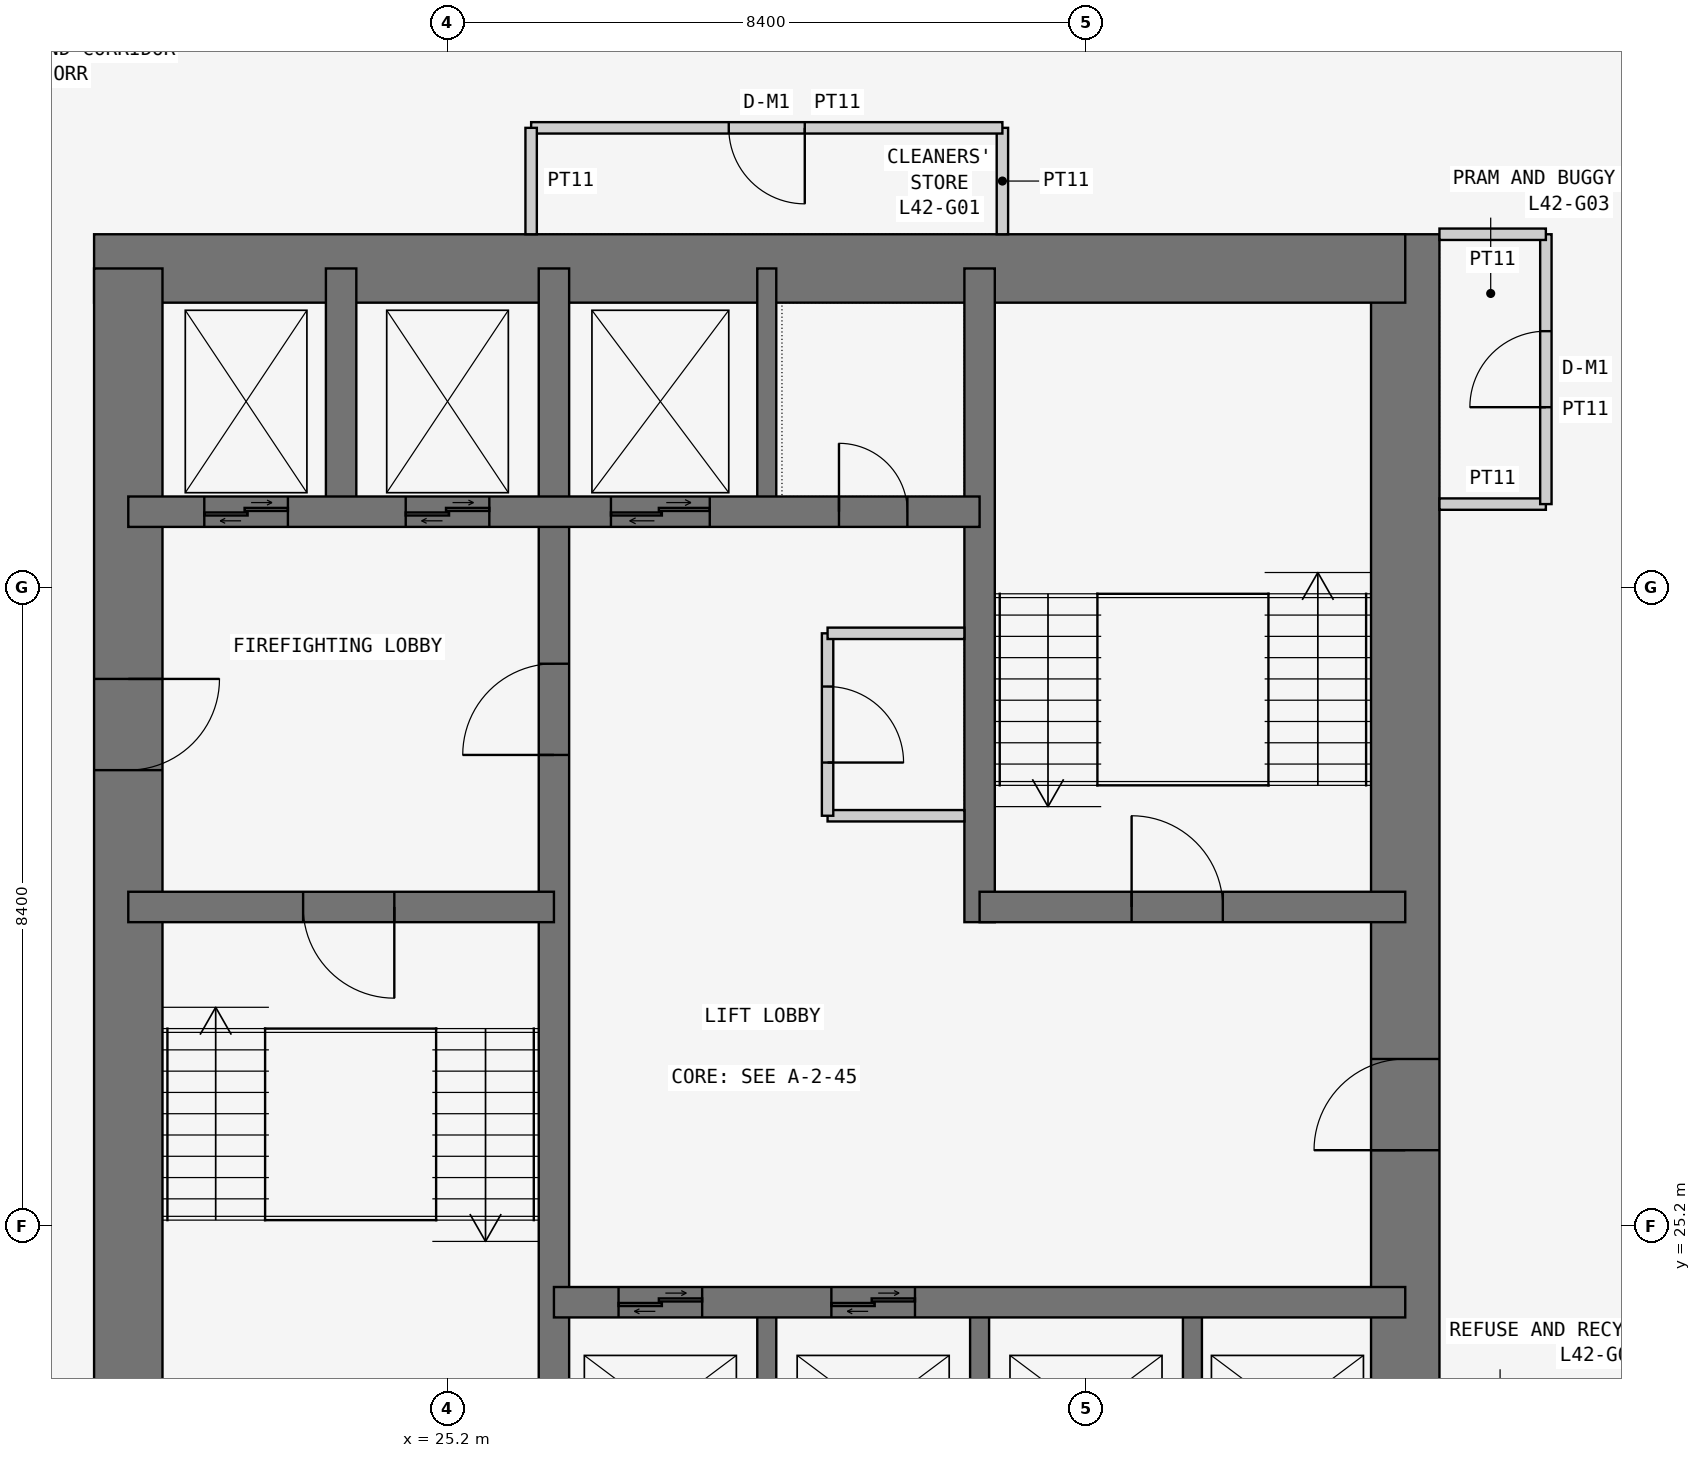
"""IFC4 building model, lengths in metres.
Left out: names, types, materials, properties, quantities, classifications, styles, units other than length and angle.
Written with IfcOpenShell. Run it as: python <this file> out.ifc"""

import sys

from ifc_helpers import new_model, si_unit, direction, frame, frame_2d, origin, place, context, subcontext, project, spatial, rectangle, extrude, element, fill, save


model = new_model("IFC4")
c1 = context("Model", 3, precision=1e-05, world=origin(), true_north=direction((0.0, 1.0)))
c2 = subcontext(c1, "Body", "Model", "MODEL_VIEW")
j1 = project(units=[si_unit("LENGTHUNIT", "METRE"), si_unit("PLANEANGLEUNIT", "RADIAN")], contexts=[c1])
p1 = place(None, origin())
s1 = spatial("IfcSite", under=j1, at=p1, CompositionType="ELEMENT")
p2 = place(p1, origin())
s2 = spatial("IfcBuilding", under=s1, at=p2, CompositionType="ELEMENT")
p3 = place(p2, frame((0.0, 0.0, 162.9)))
s3 = spatial("IfcBuildingStorey", under=s2, at=p3, CompositionType="ELEMENT", Elevation=162.9)
p4 = place(p3, frame((37.8, 21.0, 0.0), z_axis=(0.0, 0.0, 1.0), x_axis=(0.0, 1.0, 0.0)))
e1 = element("IfcWall", 1, at=p4, inside=s3, PredefinedType="SHEAR", context=c2, shape_type="SweptSolid", body=[
    extrude(rectangle(XDim=17.25, YDim=0.9, at=frame_2d((8.625, 0.0))), origin(), (0.0, 0.0, 1.0), 3.6),
])
p5 = place(p4, frame((5.2, 0.0, 0.0)))
e2 = element("IfcOpeningElement", 2, at=p5, cuts=e1, PredefinedType="OPENING", context=c2, shape_type="SweptSolid", body=[
    extrude(rectangle(XDim=1.2, YDim=2.1, at=frame_2d((0.6, 1.05))), frame((0.0, 0.46, 0.0), z_axis=(0.0, -1.0, 0.0), x_axis=(1.0, 0.0, 0.0)), (0.0, 0.0, 1.0), 0.92),
])
p6 = place(p3, frame((37.8, 37.8, 0.0), z_axis=(0.0, 0.0, 1.0), x_axis=(-1.0, 0.0, 0.0)))
e3 = element("IfcWall", 3, at=p6, inside=s3, PredefinedType="SHEAR", context=c2, shape_type="SweptSolid", body=[
    extrude(rectangle(XDim=17.25, YDim=0.9, at=frame_2d((8.625, 0.0))), origin(), (0.0, 0.0, 1.0), 3.6),
])
p7 = place(p3, frame((21.0, 37.8, 0.0), z_axis=(0.0, 0.0, 1.0), x_axis=(0.0, -1.0, 0.0)))
e4 = element("IfcWall", 4, at=p7, inside=s3, PredefinedType="SHEAR", context=c2, shape_type="SweptSolid", body=[
    extrude(rectangle(XDim=17.25, YDim=0.9, at=frame_2d((8.625, 0.0))), origin(), (0.0, 0.0, 1.0), 3.6),
])
p8 = place(p7, frame((5.4, 0.0, 0.0)))
e5 = element("IfcOpeningElement", 5, at=p8, cuts=e4, PredefinedType="OPENING", context=c2, shape_type="SweptSolid", body=[
    extrude(rectangle(XDim=1.2, YDim=2.1, at=frame_2d((0.6, 1.05))), frame((0.0, 0.46, 0.0), z_axis=(0.0, -1.0, 0.0), x_axis=(1.0, 0.0, 0.0)), (0.0, 0.0, 1.0), 0.92),
])
p9 = place(p3, frame((26.6, 21.0, 0.0), z_axis=(0.0, 0.0, 1.0), x_axis=(0.0, 1.0, 0.0)))
e6 = element("IfcWall", 6, at=p9, inside=s3, PredefinedType="SHEAR", context=c2, shape_type="SweptSolid", body=[
    extrude(rectangle(XDim=16.8, YDim=0.4, at=frame_2d((8.4, 0.0))), origin(), (0.0, 0.0, 1.0), 3.6),
])
p10 = place(p9, frame((10.4, 0.0, 0.0)))
e7 = element("IfcOpeningElement", 7, at=p10, cuts=e6, PredefinedType="OPENING", context=c2, shape_type="SweptSolid", body=[
    extrude(rectangle(XDim=1.2, YDim=2.1, at=frame_2d((0.6, 1.05))), frame((0.0, 0.21, 0.0), z_axis=(0.0, -1.0, 0.0), x_axis=(1.0, 0.0, 0.0)), (0.0, 0.0, 1.0), 0.42),
])
p11 = place(p3, frame((21.0, 29.4, 0.0), z_axis=(0.0, 0.0, 1.0), x_axis=(1.0, 0.0, 0.0)))
e8 = element("IfcWall", 8, at=p11, inside=s3, PredefinedType="SHEAR", context=c2, shape_type="SweptSolid", body=[
    extrude(rectangle(XDim=5.6, YDim=0.4, at=frame_2d((2.8, 0.0))), origin(), (0.0, 0.0, 1.0), 3.6),
])
p12 = place(p11, frame((2.3, 0.0, 0.0)))
e9 = element("IfcOpeningElement", 9, at=p12, cuts=e8, PredefinedType="OPENING", context=c2, shape_type="SweptSolid", body=[
    extrude(rectangle(XDim=1.2, YDim=2.1, at=frame_2d((0.6, 1.05))), frame((0.0, 0.21, 0.0), z_axis=(0.0, -1.0, 0.0), x_axis=(1.0, 0.0, 0.0)), (0.0, 0.0, 1.0), 0.42),
])
p13 = place(p3, frame((21.0, 34.6, 0.0), z_axis=(0.0, 0.0, 1.0), x_axis=(1.0, 0.0, 0.0)))
e10 = element("IfcWall", 10, at=p13, inside=s3, PredefinedType="SHEAR", context=c2, shape_type="SweptSolid", body=[
    extrude(rectangle(XDim=11.2, YDim=0.4, at=frame_2d((5.6, 0.0))), origin(), (0.0, 0.0, 1.0), 3.6),
])
p14 = place(p13, frame((9.35, 0.0, 0.0)))
e11 = element("IfcOpeningElement", 11, at=p14, cuts=e10, PredefinedType="OPENING", context=c2, shape_type="SweptSolid", body=[
    extrude(rectangle(XDim=0.9, YDim=2.1, at=frame_2d((0.45, 1.05))), frame((0.0, 0.21, 0.0), z_axis=(0.0, -1.0, 0.0), x_axis=(1.0, 0.0, 0.0)), (0.0, 0.0, 1.0), 0.42),
])
p15 = place(p13, frame((1.0, 0.0, 0.0)))
e12 = element("IfcOpeningElement", 12, at=p15, cuts=e10, PredefinedType="OPENING", context=c2, shape_type="SweptSolid", body=[
    extrude(rectangle(XDim=1.1, YDim=2.1, at=frame_2d((0.55, 1.05))), frame((0.0, 0.21, 0.0), z_axis=(0.0, -1.0, 0.0), x_axis=(1.0, 0.0, 0.0)), (0.0, 0.0, 1.0), 0.42),
])
p16 = place(p13, frame((3.65, 0.0, 0.0)))
e13 = element("IfcOpeningElement", 13, at=p16, cuts=e10, PredefinedType="OPENING", context=c2, shape_type="SweptSolid", body=[
    extrude(rectangle(XDim=1.1, YDim=2.1, at=frame_2d((0.55, 1.05))), frame((0.0, 0.21, 0.0), z_axis=(0.0, -1.0, 0.0), x_axis=(1.0, 0.0, 0.0)), (0.0, 0.0, 1.0), 0.42),
])
p17 = place(p13, frame((6.35, 0.0, 0.0)))
e14 = element("IfcOpeningElement", 14, at=p17, cuts=e10, PredefinedType="OPENING", context=c2, shape_type="SweptSolid", body=[
    extrude(rectangle(XDim=1.3, YDim=2.1, at=frame_2d((0.65, 1.05))), frame((0.0, 0.21, 0.0), z_axis=(0.0, -1.0, 0.0), x_axis=(1.0, 0.0, 0.0)), (0.0, 0.0, 1.0), 0.42),
])
p18 = place(p3, frame((23.8, 34.6, 0.0), z_axis=(0.0, 0.0, 1.0), x_axis=(0.0, 1.0, 0.0)))
e15 = element("IfcWall", 15, at=p18, inside=s3, PredefinedType="SHEAR", context=c2, shape_type="SweptSolid", body=[
    extrude(rectangle(XDim=3.2, YDim=0.4, at=frame_2d((1.6, 0.0))), origin(), (0.0, 0.0, 1.0), 3.6),
])
p19 = place(p3, frame((26.6, 24.2, 0.0), z_axis=(0.0, 0.0, 1.0), x_axis=(1.0, 0.0, 0.0)))
e16 = element("IfcWall", 16, at=p19, inside=s3, PredefinedType="SHEAR", context=c2, shape_type="SweptSolid", body=[
    extrude(rectangle(XDim=11.2, YDim=0.4, at=frame_2d((5.6, 0.0))), origin(), (0.0, 0.0, 1.0), 3.6),
])
p20 = place(p19, frame((0.85, 0.0, 0.0)))
e17 = element("IfcOpeningElement", 17, at=p20, cuts=e16, PredefinedType="OPENING", context=c2, shape_type="SweptSolid", body=[
    extrude(rectangle(XDim=1.1, YDim=2.1, at=frame_2d((0.55, 1.05))), frame((0.0, 0.21, 0.0), z_axis=(0.0, -1.0, 0.0), x_axis=(1.0, 0.0, 0.0)), (0.0, 0.0, 1.0), 0.42),
])
p21 = place(p19, frame((3.65, 0.0, 0.0)))
e18 = element("IfcOpeningElement", 18, at=p21, cuts=e16, PredefinedType="OPENING", context=c2, shape_type="SweptSolid", body=[
    extrude(rectangle(XDim=1.1, YDim=2.1, at=frame_2d((0.55, 1.05))), frame((0.0, 0.21, 0.0), z_axis=(0.0, -1.0, 0.0), x_axis=(1.0, 0.0, 0.0)), (0.0, 0.0, 1.0), 0.42),
])
p22 = place(p3, frame((32.2, 29.2, 0.0), z_axis=(0.0, 0.0, 1.0), x_axis=(0.0, 1.0, 0.0)))
e19 = element("IfcWall", 19, at=p22, inside=s3, PredefinedType="SHEAR", context=c2, shape_type="SweptSolid", body=[
    extrude(rectangle(XDim=8.6, YDim=0.4, at=frame_2d((4.3, 0.0))), origin(), (0.0, 0.0, 1.0), 3.6),
])
p23 = place(p3, frame((32.2, 29.4, 0.0), z_axis=(0.0, 0.0, 1.0), x_axis=(1.0, 0.0, 0.0)))
e20 = element("IfcWall", 20, at=p23, inside=s3, PredefinedType="SHEAR", context=c2, shape_type="SweptSolid", body=[
    extrude(rectangle(XDim=5.6, YDim=0.4, at=frame_2d((2.8, 0.0))), origin(), (0.0, 0.0, 1.0), 3.6),
])
p24 = place(p23, frame((2.0, 0.0, 0.0)))
e21 = element("IfcOpeningElement", 21, at=p24, cuts=e20, PredefinedType="OPENING", context=c2, shape_type="SweptSolid", body=[
    extrude(rectangle(XDim=1.2, YDim=2.1, at=frame_2d((0.6, 1.05))), frame((0.0, 0.21, 0.0), z_axis=(0.0, -1.0, 0.0), x_axis=(1.0, 0.0, 0.0)), (0.0, 0.0, 1.0), 0.42),
])
for number, where, z_axis, x_axis in (
    (22, (29.4, 21.0, 0.0), (0.0, 0.0, 1.0), (0.0, 1.0, 0.0)),
    (23, (32.2, 21.0, 0.0), (0.0, 0.0, 1.0), (0.0, 1.0, 0.0)),
    (24, (35.0, 21.0, 0.0), (0.0, 0.0, 1.0), (0.0, 1.0, 0.0)),
    (25, (29.4, 34.6, 0.0), (0.0, 0.0, 1.0), (0.0, 1.0, 0.0)),
):
    element("IfcWall", number, at=place(p3, frame(where, z_axis=z_axis, x_axis=x_axis)), inside=s3, PredefinedType="SHEAR", context=c2, shape_type="SweptSolid", body=[
        extrude(rectangle(XDim=3.2, YDim=0.25, at=frame_2d((1.6, 0.0))), origin(), (0.0, 0.0, 1.0), 3.6),
    ])
p25 = place(p3, frame((32.5, 38.25, 0.0), z_axis=(0.0, 0.0, 1.0), x_axis=(0.0, 1.0, 0.0)))
e26 = element("IfcWall", 26, at=p25, inside=s3, PredefinedType="PARTITIONING", context=c2, shape_type="SweptSolid", body=[
    extrude(rectangle(XDim=1.4, YDim=0.15, at=frame_2d((0.7, 0.0))), origin(), (0.0, 0.0, 1.0), 3.45),
])
p26 = place(p3, frame((32.5, 39.65, 0.0), z_axis=(0.0, 0.0, 1.0), x_axis=(-1.0, 0.0, 0.0)))
e27 = element("IfcWall", 27, at=p26, inside=s3, PredefinedType="PARTITIONING", context=c2, shape_type="SweptSolid", body=[
    extrude(rectangle(XDim=6.2, YDim=0.15, at=frame_2d((3.1, 0.0))), origin(), (0.0, 0.0, 1.0), 3.45),
])
p27 = place(p26, frame((2.6, 0.0, 0.0)))
e28 = element("IfcOpeningElement", 28, at=p27, cuts=e27, PredefinedType="OPENING", context=c2, shape_type="SweptSolid", body=[
    extrude(rectangle(XDim=1.0, YDim=2.1, at=frame_2d((0.5, 1.05))), frame((0.0, 0.085, 0.0), z_axis=(0.0, -1.0, 0.0), x_axis=(1.0, 0.0, 0.0)), (0.0, 0.0, 1.0), 0.17),
])
for number, where, z_axis, x_axis in (
    (29, (26.3, 39.65, 0.0), (0.0, 0.0, 1.0), (0.0, -1.0, 0.0)),
    (30, (38.25, 34.7, 0.0), (0.0, 0.0, 1.0), (1.0, 0.0, 0.0)),
):
    element("IfcWall", number, at=place(p3, frame(where, z_axis=z_axis, x_axis=x_axis)), inside=s3, PredefinedType="PARTITIONING", context=c2, shape_type="SweptSolid", body=[
        extrude(rectangle(XDim=1.4, YDim=0.15, at=frame_2d((0.7, 0.0))), origin(), (0.0, 0.0, 1.0), 3.45),
    ])
p28 = place(p3, frame((39.65, 34.7, 0.0), z_axis=(0.0, 0.0, 1.0), x_axis=(0.0, 1.0, 0.0)))
e31 = element("IfcWall", 31, at=p28, inside=s3, PredefinedType="PARTITIONING", context=c2, shape_type="SweptSolid", body=[
    extrude(rectangle(XDim=3.55, YDim=0.15, at=frame_2d((1.775, 0.0))), origin(), (0.0, 0.0, 1.0), 3.45),
])
p29 = place(p28, frame((1.275, 0.0, 0.0)))
e32 = element("IfcOpeningElement", 32, at=p29, cuts=e31, PredefinedType="OPENING", context=c2, shape_type="SweptSolid", body=[
    extrude(rectangle(XDim=1.0, YDim=2.1, at=frame_2d((0.5, 1.05))), frame((0.0, 0.085, 0.0), z_axis=(0.0, -1.0, 0.0), x_axis=(1.0, 0.0, 0.0)), (0.0, 0.0, 1.0), 0.17),
])
p30 = place(p3, frame((39.65, 38.25, 0.0), z_axis=(0.0, 0.0, 1.0), x_axis=(-1.0, 0.0, 0.0)))
e33 = element("IfcWall", 33, at=p30, inside=s3, PredefinedType="PARTITIONING", context=c2, shape_type="SweptSolid", body=[
    extrude(rectangle(XDim=1.4, YDim=0.15, at=frame_2d((0.7, 0.0))), origin(), (0.0, 0.0, 1.0), 3.45),
])
p31 = place(p3, frame((32.0, 30.6, 0.0), z_axis=(0.0, 0.0, 1.0), x_axis=(-1.0, 0.0, 0.0)))
e34 = element("IfcWall", 34, at=p31, inside=s3, PredefinedType="PARTITIONING", context=c2, shape_type="SweptSolid", body=[
    extrude(rectangle(XDim=1.8, YDim=0.15, at=frame_2d((0.9, 0.0))), origin(), (0.0, 0.0, 1.0), 3.45),
])
p32 = place(p3, frame((30.2, 30.6, 0.0), z_axis=(0.0, 0.0, 1.0), x_axis=(0.0, 1.0, 0.0)))
e35 = element("IfcWall", 35, at=p32, inside=s3, PredefinedType="PARTITIONING", context=c2, shape_type="SweptSolid", body=[
    extrude(rectangle(XDim=2.4, YDim=0.15, at=frame_2d((1.2, 0.0))), origin(), (0.0, 0.0, 1.0), 3.45),
])
p33 = place(p32, frame((0.7, 0.0, 0.0)))
e36 = element("IfcOpeningElement", 36, at=p33, cuts=e35, PredefinedType="OPENING", context=c2, shape_type="SweptSolid", body=[
    extrude(rectangle(XDim=1.0, YDim=2.1, at=frame_2d((0.5, 1.05))), frame((0.0, 0.085, 0.0), z_axis=(0.0, -1.0, 0.0), x_axis=(1.0, 0.0, 0.0)), (0.0, 0.0, 1.0), 0.17),
])
p34 = place(p3, frame((30.2, 33.0, 0.0), z_axis=(0.0, 0.0, 1.0), x_axis=(1.0, 0.0, 0.0)))
e37 = element("IfcWall", 37, at=p34, inside=s3, PredefinedType="PARTITIONING", context=c2, shape_type="SweptSolid", body=[
    extrude(rectangle(XDim=1.8, YDim=0.15, at=frame_2d((0.9, 0.0))), origin(), (0.0, 0.0, 1.0), 3.45),
])
p35 = place(p27, origin())
e38 = element("IfcDoor", 38, at=p35, inside=s3, OperationType="SINGLE_SWING_LEFT", PredefinedType="DOOR", context=c2, shape_type="SweptSolid", body=[
    extrude(rectangle(XDim=1.0, YDim=2.1, at=frame_2d((0.5, 1.05))), frame((0.0, 0.025, 0.0), z_axis=(0.0, -1.0, 0.0), x_axis=(1.0, 0.0, 0.0)), (0.0, 0.0, 1.0), 0.05),
])
fill(e28, e38)
p36 = place(p29, origin())
e39 = element("IfcDoor", 39, at=p36, inside=s3, OperationType="SINGLE_SWING_LEFT", PredefinedType="DOOR", context=c2, shape_type="SweptSolid", body=[
    extrude(rectangle(XDim=1.0, YDim=2.1, at=frame_2d((0.5, 1.05))), frame((0.0, 0.025, 0.0), z_axis=(0.0, -1.0, 0.0), x_axis=(1.0, 0.0, 0.0)), (0.0, 0.0, 1.0), 0.05),
])
fill(e32, e39)
p37 = place(p8, origin())
e40 = element("IfcDoor", 40, at=p37, inside=s3, OperationType="SINGLE_SWING_LEFT", PredefinedType="DOOR", context=c2, shape_type="SweptSolid", body=[
    extrude(rectangle(XDim=1.2, YDim=2.1, at=frame_2d((0.6, 1.05))), frame((0.0, 0.025, 0.0), z_axis=(0.0, -1.0, 0.0), x_axis=(1.0, 0.0, 0.0)), (0.0, 0.0, 1.0), 0.05),
])
fill(e5, e40)
p38 = place(p12, frame((1.2, 0.0, 0.0), z_axis=(0.0, 0.0, 1.0), x_axis=(-1.0, 0.0, 0.0)))
e41 = element("IfcDoor", 41, at=p38, inside=s3, OperationType="SINGLE_SWING_LEFT", PredefinedType="DOOR", context=c2, shape_type="SweptSolid", body=[
    extrude(rectangle(XDim=1.2, YDim=2.1, at=frame_2d((0.6, 1.05))), frame((0.0, 0.025, 0.0), z_axis=(0.0, -1.0, 0.0), x_axis=(1.0, 0.0, 0.0)), (0.0, 0.0, 1.0), 0.05),
])
fill(e9, e41)
p39 = place(p10, origin())
e42 = element("IfcDoor", 42, at=p39, inside=s3, OperationType="SINGLE_SWING_LEFT", PredefinedType="DOOR", context=c2, shape_type="SweptSolid", body=[
    extrude(rectangle(XDim=1.2, YDim=2.1, at=frame_2d((0.6, 1.05))), frame((0.0, 0.025, 0.0), z_axis=(0.0, -1.0, 0.0), x_axis=(1.0, 0.0, 0.0)), (0.0, 0.0, 1.0), 0.05),
])
fill(e7, e42)
p40 = place(p5, origin())
e43 = element("IfcDoor", 43, at=p40, inside=s3, OperationType="SINGLE_SWING_LEFT", PredefinedType="DOOR", context=c2, shape_type="SweptSolid", body=[
    extrude(rectangle(XDim=1.2, YDim=2.1, at=frame_2d((0.6, 1.05))), frame((0.0, 0.025, 0.0), z_axis=(0.0, -1.0, 0.0), x_axis=(1.0, 0.0, 0.0)), (0.0, 0.0, 1.0), 0.05),
])
fill(e2, e43)
p41 = place(p24, origin())
e44 = element("IfcDoor", 44, at=p41, inside=s3, OperationType="SINGLE_SWING_LEFT", PredefinedType="DOOR", context=c2, shape_type="SweptSolid", body=[
    extrude(rectangle(XDim=1.2, YDim=2.1, at=frame_2d((0.6, 1.05))), frame((0.0, 0.025, 0.0), z_axis=(0.0, -1.0, 0.0), x_axis=(1.0, 0.0, 0.0)), (0.0, 0.0, 1.0), 0.05),
])
fill(e21, e44)
p42 = place(p14, origin())
e45 = element("IfcDoor", 45, at=p42, inside=s3, OperationType="SINGLE_SWING_LEFT", PredefinedType="DOOR", context=c2, shape_type="SweptSolid", body=[
    extrude(rectangle(XDim=0.9, YDim=2.1, at=frame_2d((0.45, 1.05))), frame((0.0, 0.025, 0.0), z_axis=(0.0, -1.0, 0.0), x_axis=(1.0, 0.0, 0.0)), (0.0, 0.0, 1.0), 0.05),
])
fill(e11, e45)
p43 = place(p33, frame((1.0, 0.0, 0.0), z_axis=(0.0, 0.0, 1.0), x_axis=(-1.0, 0.0, 0.0)))
e46 = element("IfcDoor", 46, at=p43, inside=s3, OperationType="SINGLE_SWING_RIGHT", PredefinedType="DOOR", context=c2, shape_type="SweptSolid", body=[
    extrude(rectangle(XDim=1.0, YDim=2.1, at=frame_2d((0.5, 1.05))), frame((0.0, 0.025, 0.0), z_axis=(0.0, -1.0, 0.0), x_axis=(1.0, 0.0, 0.0)), (0.0, 0.0, 1.0), 0.05),
])
fill(e36, e46)
p44 = place(p20, origin())
e47 = element("IfcDoor", 47, at=p44, inside=s3, OperationType="DOUBLE_DOOR_SLIDING", PredefinedType="DOOR", context=c2, shape_type="SweptSolid", body=[
    extrude(rectangle(XDim=1.1, YDim=2.1, at=frame_2d((0.55, 1.05))), frame((0.0, 0.025, 0.0), z_axis=(0.0, -1.0, 0.0), x_axis=(1.0, 0.0, 0.0)), (0.0, 0.0, 1.0), 0.05),
])
fill(e17, e47)
p45 = place(p21, origin())
e48 = element("IfcDoor", 48, at=p45, inside=s3, OperationType="DOUBLE_DOOR_SLIDING", PredefinedType="DOOR", context=c2, shape_type="SweptSolid", body=[
    extrude(rectangle(XDim=1.1, YDim=2.1, at=frame_2d((0.55, 1.05))), frame((0.0, 0.025, 0.0), z_axis=(0.0, -1.0, 0.0), x_axis=(1.0, 0.0, 0.0)), (0.0, 0.0, 1.0), 0.05),
])
fill(e18, e48)
p46 = place(p15, origin())
e49 = element("IfcDoor", 49, at=p46, inside=s3, OperationType="DOUBLE_DOOR_SLIDING", PredefinedType="DOOR", context=c2, shape_type="SweptSolid", body=[
    extrude(rectangle(XDim=1.1, YDim=2.1, at=frame_2d((0.55, 1.05))), frame((0.0, 0.025, 0.0), z_axis=(0.0, -1.0, 0.0), x_axis=(1.0, 0.0, 0.0)), (0.0, 0.0, 1.0), 0.05),
])
fill(e12, e49)
p47 = place(p16, origin())
e50 = element("IfcDoor", 50, at=p47, inside=s3, OperationType="DOUBLE_DOOR_SLIDING", PredefinedType="DOOR", context=c2, shape_type="SweptSolid", body=[
    extrude(rectangle(XDim=1.1, YDim=2.1, at=frame_2d((0.55, 1.05))), frame((0.0, 0.025, 0.0), z_axis=(0.0, -1.0, 0.0), x_axis=(1.0, 0.0, 0.0)), (0.0, 0.0, 1.0), 0.05),
])
fill(e13, e50)
p48 = place(p17, origin())
e51 = element("IfcDoor", 51, at=p48, inside=s3, OperationType="DOUBLE_DOOR_SLIDING", PredefinedType="DOOR", context=c2, shape_type="SweptSolid", body=[
    extrude(rectangle(XDim=1.3, YDim=2.1, at=frame_2d((0.65, 1.05))), frame((0.0, 0.025, 0.0), z_axis=(0.0, -1.0, 0.0), x_axis=(1.0, 0.0, 0.0)), (0.0, 0.0, 1.0), 0.05),
])
fill(e14, e51)
save(model, sys.argv[1])
